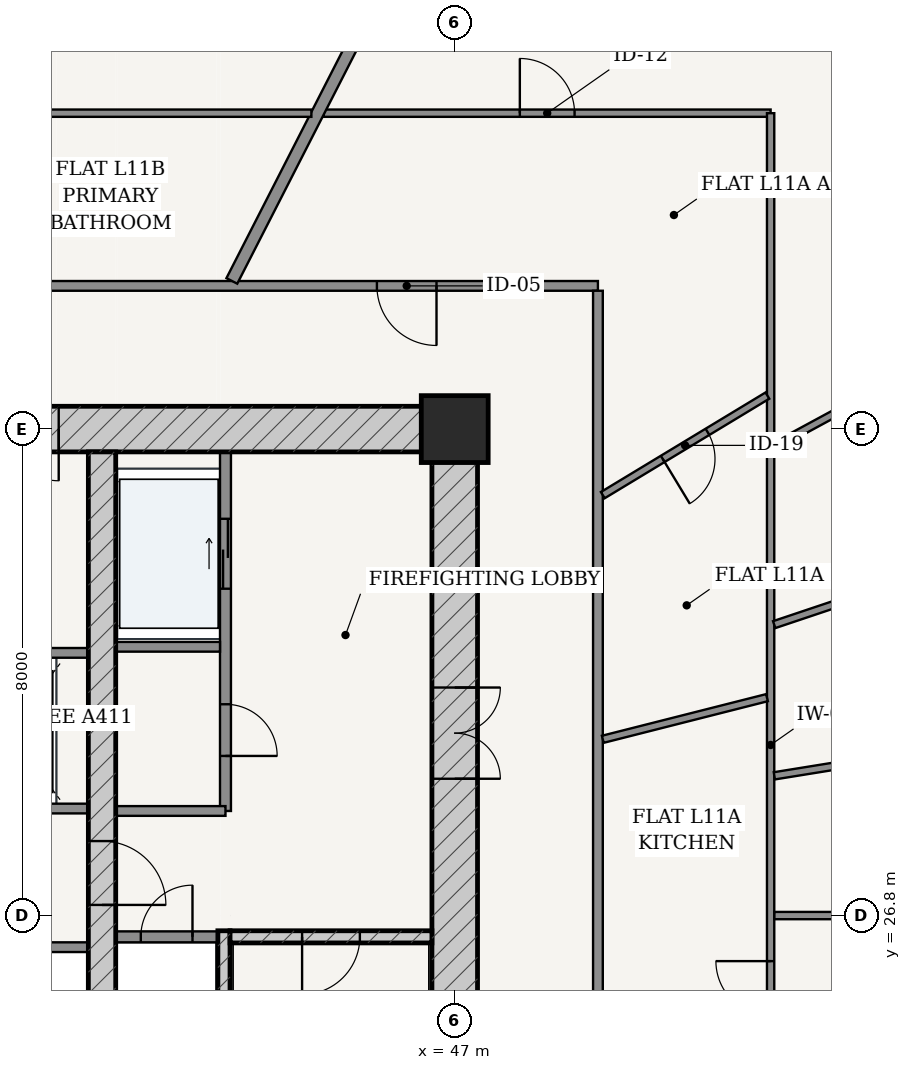
"""IFC4 building model, lengths in metres.
Left out: names, types, materials, properties, quantities, classifications, styles, units other than length and angle.
Written with IfcOpenShell. Run it as: python <this file> out.ifc"""

import sys

from ifc_helpers import new_model, si_unit, direction, frame, frame_2d, origin, origin_2d, place, context, subcontext, project, spatial, rectangle, extrude, source, transform, mapped, element, fill, save


model = new_model("IFC4")
c1 = context("Model", 3, precision=1e-05, world=origin(), true_north=direction((-0.2419218956, 0.970295726276)))
c2 = subcontext(c1, "Body", "Model", "MODEL_VIEW")
j1 = project(units=[si_unit("LENGTHUNIT", "METRE"), si_unit("PLANEANGLEUNIT", "RADIAN")], contexts=[c1])
p1 = place(None, origin())
s1 = spatial("IfcSite", under=j1, at=p1, CompositionType="ELEMENT")
p2 = place(p1, origin())
s2 = spatial("IfcBuilding", under=s1, at=p2, CompositionType="ELEMENT")
p3 = place(p2, frame((0.0, 0.0, 45.6)))
s3 = spatial("IfcBuildingStorey", under=s2, at=p3, CompositionType="ELEMENT", Elevation=45.6)
p4 = place(p3, frame((47.0, 34.8, 0.0), z_axis=(0.0, 0.0, 1.0), x_axis=(1.0, 0.0, 0.0)))
e1 = element("IfcColumn", 1, at=p4, inside=s3, PredefinedType="COLUMN", context=c2, shape_type="SweptSolid", body=[
    extrude(rectangle(XDim=1.1, YDim=1.1, at=origin_2d()), origin(), (0.0, 0.0, 1.0), 3.6),
])
p5 = place(p3, frame((28.625, 34.8, 0.0), z_axis=(0.0, 0.0, 1.0), x_axis=(1.0, 0.0, 0.0)))
e2 = element("IfcWall", 2, at=p5, inside=s3, PredefinedType="SHEAR", context=c2, shape_type="SweptSolid", body=[
    extrude(rectangle(XDim=18.75, YDim=0.75, at=frame_2d((9.375, 0.0))), origin(), (0.0, 0.0, 1.0), 3.32),
])
p6 = place(p5, frame((6.887, 0.0, 0.0)))
e3 = element("IfcOpeningElement", 3, at=p6, cuts=e2, PredefinedType="OPENING", context=c2, shape_type="SweptSolid", body=[
    extrude(rectangle(XDim=0.85, YDim=2.1, at=frame_2d((0.425, 1.05))), frame((0.0, 0.385, 0.0), z_axis=(0.0, -1.0, 0.0), x_axis=(1.0, 0.0, 0.0)), (0.0, 0.0, 1.0), 0.77),
])
p7 = place(p5, frame((8.945, 0.0, 0.0)))
e4 = element("IfcOpeningElement", 4, at=p7, cuts=e2, PredefinedType="OPENING", context=c2, shape_type="SweptSolid", body=[
    extrude(rectangle(XDim=0.86, YDim=2.1, at=frame_2d((0.43, 1.05))), frame((0.0, 0.385, 0.0), z_axis=(0.0, -1.0, 0.0), x_axis=(1.0, 0.0, 0.0)), (0.0, 0.0, 1.0), 0.77),
])
p8 = place(p5, frame((11.012, 0.0, 0.0)))
e5 = element("IfcOpeningElement", 5, at=p8, cuts=e2, PredefinedType="OPENING", context=c2, shape_type="SweptSolid", body=[
    extrude(rectangle(XDim=0.85, YDim=2.1, at=frame_2d((0.425, 1.05))), frame((0.0, 0.385, 0.0), z_axis=(0.0, -1.0, 0.0), x_axis=(1.0, 0.0, 0.0)), (0.0, 0.0, 1.0), 0.77),
])
p9 = place(p3, frame((47.0, 19.175, 0.0), z_axis=(0.0, 0.0, 1.0), x_axis=(0.0, 1.0, 0.0)))
e6 = element("IfcWall", 6, at=p9, inside=s3, PredefinedType="SHEAR", context=c2, shape_type="SweptSolid", body=[
    extrude(rectangle(XDim=15.25, YDim=0.75, at=frame_2d((7.625, 0.0))), origin(), (0.0, 0.0, 1.0), 3.32),
])
p10 = place(p9, frame((9.875, 0.0, 0.0)))
e7 = element("IfcOpeningElement", 7, at=p10, cuts=e6, PredefinedType="OPENING", context=c2, shape_type="SweptSolid", body=[
    extrude(rectangle(XDim=1.5, YDim=2.2, at=frame_2d((0.75, 1.1))), frame((0.0, 0.385, 0.0), z_axis=(0.0, -1.0, 0.0), x_axis=(1.0, 0.0, 0.0)), (0.0, 0.0, 1.0), 0.77),
])
p11 = place(p3, frame((43.205, 19.175, 0.0), z_axis=(0.0, 0.0, 1.0), x_axis=(0.0, 1.0, 0.0)))
e8 = element("IfcWall", 8, at=p11, inside=s3, PredefinedType="SOLIDWALL", context=c2, shape_type="SweptSolid", body=[
    extrude(rectangle(XDim=7.375, YDim=0.2, at=frame_2d((3.688, 0.0))), origin(), (0.0, 0.0, 1.0), 3.32),
])
p12 = place(p3, frame((43.305, 26.45, 0.0), z_axis=(0.0, 0.0, 1.0), x_axis=(1.0, 0.0, 0.0)))
e9 = element("IfcWall", 9, at=p12, inside=s3, PredefinedType="SOLIDWALL", context=c2, shape_type="SweptSolid", body=[
    extrude(rectangle(XDim=3.32, YDim=0.2, at=frame_2d((1.66, 0.0))), origin(), (0.0, 0.0, 1.0), 3.32),
])
p13 = place(p12, frame((1.185, 0.0, 0.0)))
e10 = element("IfcOpeningElement", 10, at=p13, cuts=e9, PredefinedType="OPENING", context=c2, shape_type="SweptSolid", body=[
    extrude(rectangle(XDim=0.95, YDim=2.15, at=frame_2d((0.475, 1.075))), frame((0.0, 0.11, 0.0), z_axis=(0.0, -1.0, 0.0), x_axis=(1.0, 0.0, 0.0)), (0.0, 0.0, 1.0), 0.22),
])
p14 = place(p3, frame((41.2, 19.175, 0.0), z_axis=(0.0, 0.0, 1.0), x_axis=(0.0, 1.0, 0.0)))
e11 = element("IfcWall", 11, at=p14, inside=s3, PredefinedType="SHEAR", context=c2, shape_type="SweptSolid", body=[
    extrude(rectangle(XDim=15.25, YDim=0.45, at=frame_2d((7.625, 0.0))), origin(), (0.0, 0.0, 1.0), 3.32),
])
p15 = place(p14, frame((7.8, 0.0, 0.0)))
e12 = element("IfcOpeningElement", 12, at=p15, cuts=e11, PredefinedType="OPENING", context=c2, shape_type="SweptSolid", body=[
    extrude(rectangle(XDim=1.05, YDim=2.15, at=frame_2d((0.525, 1.075))), frame((0.0, 0.235, 0.0), z_axis=(0.0, -1.0, 0.0), x_axis=(1.0, 0.0, 0.0)), (0.0, 0.0, 1.0), 0.47),
])
p16 = place(p3, frame((41.425, 26.45, 0.0), z_axis=(0.0, 0.0, 1.0), x_axis=(1.0, 0.0, 0.0)))
e13 = element("IfcWall", 13, at=p16, inside=s3, PredefinedType="PARTITIONING", context=c2, shape_type="SweptSolid", body=[
    extrude(rectangle(XDim=1.675, YDim=0.18, at=frame_2d((0.837, 0.0))), origin(), (0.0, 0.0, 1.0), 3.32),
])
p17 = place(p16, frame((0.413, 0.0, 0.0)))
e14 = element("IfcOpeningElement", 14, at=p17, cuts=e13, PredefinedType="OPENING", context=c2, shape_type="SweptSolid", body=[
    extrude(rectangle(XDim=0.85, YDim=2.1, at=frame_2d((0.425, 1.05))), frame((0.0, 0.1, 0.0), z_axis=(0.0, -1.0, 0.0), x_axis=(1.0, 0.0, 0.0)), (0.0, 0.0, 1.0), 0.2),
])
p18 = place(p3, frame((43.23, 28.52, 0.0), z_axis=(0.0, 0.0, 1.0), x_axis=(0.0, 1.0, 0.0)))
e15 = element("IfcWall", 15, at=p18, inside=s3, PredefinedType="PARTITIONING", context=c2, shape_type="SweptSolid", body=[
    extrude(rectangle(XDim=5.905, YDim=0.18, at=frame_2d((2.953, 0.0))), origin(), (0.0, 0.0, 1.0), 3.32),
])
p19 = place(p18, frame((0.905, 0.0, 0.0)))
e16 = element("IfcOpeningElement", 16, at=p19, cuts=e15, PredefinedType="OPENING", context=c2, shape_type="SweptSolid", body=[
    extrude(rectangle(XDim=0.85, YDim=2.1, at=frame_2d((0.425, 1.05))), frame((0.0, 0.1, 0.0), z_axis=(0.0, -1.0, 0.0), x_axis=(1.0, 0.0, 0.0)), (0.0, 0.0, 1.0), 0.2),
])
p20 = place(p18, frame((3.655, 0.0, 0.0)))
e17 = element("IfcOpeningElement", 17, at=p20, cuts=e15, PredefinedType="OPENING", context=c2, shape_type="SweptSolid", body=[
    extrude(rectangle(XDim=1.15, YDim=2.2, at=frame_2d((0.575, 1.1))), frame((0.0, 0.1, 0.0), z_axis=(0.0, -1.0, 0.0), x_axis=(1.0, 0.0, 0.0)), (0.0, 0.0, 1.0), 0.2),
])
p21 = place(p3, frame((41.425, 31.22, 0.0), z_axis=(0.0, 0.0, 1.0), x_axis=(1.0, 0.0, 0.0)))
e18 = element("IfcWall", 18, at=p21, inside=s3, PredefinedType="PARTITIONING", context=c2, shape_type="SweptSolid", body=[
    extrude(rectangle(XDim=1.715, YDim=0.16, at=frame_2d((0.857, 0.0))), origin(), (0.0, 0.0, 1.0), 3.32),
])
p22 = place(p3, frame((41.425, 28.52, 0.0), z_axis=(0.0, 0.0, 1.0), x_axis=(1.0, 0.0, 0.0)))
e19 = element("IfcWall", 19, at=p22, inside=s3, PredefinedType="PARTITIONING", context=c2, shape_type="SweptSolid", body=[
    extrude(rectangle(XDim=1.805, YDim=0.16, at=frame_2d((0.902, 0.0))), origin(), (0.0, 0.0, 1.0), 3.32),
])
p23 = place(p3, frame((35.025, 28.56, 0.0), z_axis=(0.0, 0.0, 1.0), x_axis=(1.0, 0.0, 0.0)))
e20 = element("IfcWall", 20, at=p23, inside=s3, PredefinedType="PARTITIONING", context=c2, shape_type="SweptSolid", body=[
    extrude(rectangle(XDim=5.95, YDim=0.16, at=frame_2d((2.975, 0.0))), origin(), (0.0, 0.0, 1.0), 3.32),
])
p24 = place(p23, frame((0.76, 0.0, 0.0)))
e21 = element("IfcOpeningElement", 21, at=p24, cuts=e20, PredefinedType="OPENING", context=c2, shape_type="SweptSolid", body=[
    extrude(rectangle(XDim=1.1, YDim=2.2, at=frame_2d((0.55, 1.1))), frame((0.0, 0.09, 0.0), z_axis=(0.0, -1.0, 0.0), x_axis=(1.0, 0.0, 0.0)), (0.0, 0.0, 1.0), 0.18),
])
p25 = place(p23, frame((2.425, 0.0, 0.0)))
e22 = element("IfcOpeningElement", 22, at=p25, cuts=e20, PredefinedType="OPENING", context=c2, shape_type="SweptSolid", body=[
    extrude(rectangle(XDim=1.1, YDim=2.2, at=frame_2d((0.55, 1.1))), frame((0.0, 0.09, 0.0), z_axis=(0.0, -1.0, 0.0), x_axis=(1.0, 0.0, 0.0)), (0.0, 0.0, 1.0), 0.18),
])
p26 = place(p23, frame((4.09, 0.0, 0.0)))
e23 = element("IfcOpeningElement", 23, at=p26, cuts=e20, PredefinedType="OPENING", context=c2, shape_type="SweptSolid", body=[
    extrude(rectangle(XDim=1.1, YDim=2.2, at=frame_2d((0.55, 1.1))), frame((0.0, 0.09, 0.0), z_axis=(0.0, -1.0, 0.0), x_axis=(1.0, 0.0, 0.0)), (0.0, 0.0, 1.0), 0.18),
])
for number, where, z_axis, x_axis in (
    (24, (35.025, 31.12, 0.0), (0.0, 0.0, 1.0), (1.0, 0.0, 0.0)),
    (25, (35.025, 26.28, 0.0), (0.0, 0.0, 1.0), (1.0, 0.0, 0.0)),
):
    element("IfcWall", number, at=place(p3, frame(where, z_axis=z_axis, x_axis=x_axis)), inside=s3, PredefinedType="PARTITIONING", context=c2, shape_type="SweptSolid", body=[
        extrude(rectangle(XDim=5.95, YDim=0.16, at=frame_2d((2.975, 0.0))), origin(), (0.0, 0.0, 1.0), 3.32),
    ])
p27 = place(p3, frame((26.645, 37.155, 0.0), z_axis=(0.0, 0.0, 1.0), x_axis=(1.0, 0.0, 0.0)))
e26 = element("IfcWall", 26, at=p27, inside=s3, PredefinedType="PARTITIONING", context=c2, shape_type="SweptSolid", body=[
    extrude(rectangle(XDim=22.71, YDim=0.16, at=frame_2d((11.355, 0.0))), origin(), (0.0, 0.0, 1.0), 2.688),
])
p28 = place(p27, frame((19.075, 0.0, 0.0)))
e27 = element("IfcOpeningElement", 27, at=p28, cuts=e26, PredefinedType="OPENING", context=c2, shape_type="SweptSolid", body=[
    extrude(rectangle(XDim=0.98, YDim=2.2, at=frame_2d((0.49, 1.1))), frame((0.0, 0.09, 0.0), z_axis=(0.0, -1.0, 0.0), x_axis=(1.0, 0.0, 0.0)), (0.0, 0.0, 1.0), 0.18),
])
p29 = place(p27, frame((6.221, 0.0, 0.0)))
e28 = element("IfcOpeningElement", 28, at=p29, cuts=e26, PredefinedType="OPENING", context=c2, shape_type="SweptSolid", body=[
    extrude(rectangle(XDim=0.98, YDim=2.2, at=frame_2d((0.49, 1.1))), frame((0.0, 0.09, 0.0), z_axis=(0.0, -1.0, 0.0), x_axis=(1.0, 0.0, 0.0)), (0.0, 0.0, 1.0), 0.18),
])
p30 = place(p3, frame((49.355, 16.525, 0.0), z_axis=(0.0, 0.0, 1.0), x_axis=(0.0, 1.0, 0.0)))
e29 = element("IfcWall", 29, at=p30, inside=s3, PredefinedType="PARTITIONING", context=c2, shape_type="SweptSolid", body=[
    extrude(rectangle(XDim=20.55, YDim=0.16, at=frame_2d((10.275, 0.0))), origin(), (0.0, 0.0, 1.0), 2.688),
])
p31 = place(p3, frame((44.847, 39.995, 0.0), z_axis=(0.0, 0.0, 1.0), x_axis=(1.0, 0.0, 0.0)))
e30 = element("IfcWall", 30, at=p31, inside=s3, PredefinedType="PARTITIONING", context=c2, shape_type="SweptSolid", body=[
    extrude(rectangle(XDim=7.348, YDim=0.12, at=frame_2d((3.674, 0.0))), origin(), (0.0, 0.0, 1.0), 2.688),
])
p32 = place(p31, frame((3.224, 0.0, 0.0)))
e31 = element("IfcOpeningElement", 31, at=p32, cuts=e30, PredefinedType="OPENING", context=c2, shape_type="SweptSolid", body=[
    extrude(rectangle(XDim=0.9, YDim=2.15, at=frame_2d((0.45, 1.075))), frame((0.0, 0.07, 0.0), z_axis=(0.0, -1.0, 0.0), x_axis=(1.0, 0.0, 0.0)), (0.0, 0.0, 1.0), 0.14),
])
p33 = place(p3, frame((52.195, 39.995, 0.0), z_axis=(0.0, 0.0, 1.0), x_axis=(0.0, -1.0, 0.0)))
e32 = element("IfcWall", 32, at=p33, inside=s3, PredefinedType="PARTITIONING", context=c2, shape_type="SweptSolid", body=[
    extrude(rectangle(XDim=20.779, YDim=0.12, at=frame_2d((10.39, 0.0))), origin(), (0.0, 0.0, 1.0), 2.688),
])
p34 = place(p33, frame((13.944, 0.0, 0.0)))
e33 = element("IfcOpeningElement", 33, at=p34, cuts=e32, PredefinedType="OPENING", context=c2, shape_type="SweptSolid", body=[
    extrude(rectangle(XDim=0.9, YDim=2.15, at=frame_2d((0.45, 1.075))), frame((0.0, 0.07, 0.0), z_axis=(0.0, -1.0, 0.0), x_axis=(1.0, 0.0, 0.0)), (0.0, 0.0, 1.0), 0.14),
])
p35 = place(p33, frame((17.655, 0.0, 0.0)))
e34 = element("IfcOpeningElement", 34, at=p35, cuts=e32, PredefinedType="OPENING", context=c2, shape_type="SweptSolid", body=[
    extrude(rectangle(XDim=0.9, YDim=2.15, at=frame_2d((0.45, 1.075))), frame((0.0, 0.07, 0.0), z_axis=(0.0, -1.0, 0.0), x_axis=(1.0, 0.0, 0.0)), (0.0, 0.0, 1.0), 0.14),
])
p36 = place(p3, frame((52.257, 26.8, 0.0), z_axis=(0.0, 0.0, 1.0), x_axis=(1.0, 0.0, 0.0)))
e35 = element("IfcWall", 35, at=p36, inside=s3, PredefinedType="PARTITIONING", context=c2, shape_type="SweptSolid", body=[
    extrude(rectangle(XDim=14.683, YDim=0.12, at=frame_2d((7.341, 0.0))), origin(), (0.0, 0.0, 1.0), 2.762),
])
p37 = place(p36, frame((6.892, 0.0, 0.0)))
e36 = element("IfcOpeningElement", 36, at=p37, cuts=e35, PredefinedType="OPENING", context=c2, shape_type="SweptSolid", body=[
    extrude(rectangle(XDim=0.9, YDim=2.15, at=frame_2d((0.45, 1.075))), frame((0.0, 0.07, 0.0), z_axis=(0.0, -1.0, 0.0), x_axis=(1.0, 0.0, 0.0)), (0.0, 0.0, 1.0), 0.14),
])
p38 = place(p3, frame((52.256, 29.098, 0.0), z_axis=(0.0, 0.0, 1.0), x_axis=(0.987257017041, 0.159133850272, 0.0)))
e37 = element("IfcWall", 37, at=p38, inside=s3, PredefinedType="PARTITIONING", context=c2, shape_type="SweptSolid", body=[
    extrude(rectangle(XDim=14.248, YDim=0.12, at=frame_2d((7.124, 0.0))), origin(), (0.0, 0.0, 1.0), 2.688),
])
p39 = place(p38, frame((5.603, 0.0, 0.0)))
e38 = element("IfcOpeningElement", 38, at=p39, cuts=e37, PredefinedType="OPENING", context=c2, shape_type="SweptSolid", body=[
    extrude(rectangle(XDim=0.9, YDim=2.15, at=frame_2d((0.45, 1.075))), frame((0.0, 0.07, 0.0), z_axis=(0.0, -1.0, 0.0), x_axis=(1.0, 0.0, 0.0)), (0.0, 0.0, 1.0), 0.14),
])
p40 = place(p3, frame((52.254, 31.584, 0.0), z_axis=(0.0, 0.0, 1.0), x_axis=(0.948022802246, 0.318202398516, 0.0)))
e39 = element("IfcWall", 39, at=p40, inside=s3, PredefinedType="PARTITIONING", context=c2, shape_type="SweptSolid", body=[
    extrude(rectangle(XDim=13.163, YDim=0.12, at=frame_2d((6.582, 0.0))), origin(), (0.0, 0.0, 1.0), 2.762),
])
p41 = place(p40, frame((6.131, 0.0, 0.0)))
e40 = element("IfcOpeningElement", 40, at=p41, cuts=e39, PredefinedType="OPENING", context=c2, shape_type="SweptSolid", body=[
    extrude(rectangle(XDim=0.9, YDim=2.15, at=frame_2d((0.45, 1.075))), frame((0.0, 0.07, 0.0), z_axis=(0.0, -1.0, 0.0), x_axis=(1.0, 0.0, 0.0)), (0.0, 0.0, 1.0), 0.14),
])
p42 = place(p3, frame((52.25, 34.515, 0.0), z_axis=(0.0, 0.0, 1.0), x_axis=(0.879370672984, 0.476137815654, 0.0)))
e41 = element("IfcWall", 41, at=p42, inside=s3, PredefinedType="PARTITIONING", context=c2, shape_type="SweptSolid", body=[
    extrude(rectangle(XDim=11.094, YDim=0.12, at=frame_2d((5.547, 0.0))), origin(), (0.0, 0.0, 1.0), 2.688),
])
p43 = place(p42, frame((4.034, 0.0, 0.0)))
e42 = element("IfcOpeningElement", 42, at=p43, cuts=e41, PredefinedType="OPENING", context=c2, shape_type="SweptSolid", body=[
    extrude(rectangle(XDim=0.9, YDim=2.15, at=frame_2d((0.45, 1.075))), frame((0.0, 0.07, 0.0), z_axis=(0.0, -1.0, 0.0), x_axis=(1.0, 0.0, 0.0)), (0.0, 0.0, 1.0), 0.14),
])
p44 = place(p3, frame((49.435, 29.699, 0.0), z_axis=(0.0, 0.0, 1.0), x_axis=(0.969327617988, 0.245772189243, 0.0)))
e43 = element("IfcWall", 43, at=p44, inside=s3, PredefinedType="PARTITIONING", context=c2, shape_type="SweptSolid", body=[
    extrude(rectangle(XDim=2.785, YDim=0.12, at=frame_2d((1.393, 0.0))), origin(), (0.0, 0.0, 1.0), 3.32),
])
p45 = place(p3, frame((49.435, 33.714, 0.0), z_axis=(0.0, 0.0, 1.0), x_axis=(0.855724035959, 0.517432482824, 0.0)))
e44 = element("IfcWall", 44, at=p45, inside=s3, PredefinedType="PARTITIONING", context=c2, shape_type="SweptSolid", body=[
    extrude(rectangle(XDim=3.163, YDim=0.12, at=frame_2d((1.582, 0.0))), origin(), (0.0, 0.0, 1.0), 3.32),
])
p46 = place(p45, frame((1.152, 0.0, 0.0)))
e45 = element("IfcOpeningElement", 45, at=p46, cuts=e44, PredefinedType="OPENING", context=c2, shape_type="SweptSolid", body=[
    extrude(rectangle(XDim=0.86, YDim=2.15, at=frame_2d((0.43, 1.075))), frame((0.0, 0.07, 0.0), z_axis=(0.0, -1.0, 0.0), x_axis=(1.0, 0.0, 0.0)), (0.0, 0.0, 1.0), 0.14),
])
p47 = place(p3, frame((43.335, 37.237, 0.0), z_axis=(0.0, 0.0, 1.0), x_axis=(0.455148959499, 0.890415310216, 0.0)))
e46 = element("IfcWall", 46, at=p47, inside=s3, PredefinedType="PARTITIONING", context=c2, shape_type="SweptSolid", body=[
    extrude(rectangle(XDim=12.598, YDim=0.2, at=frame_2d((6.299, 0.0))), origin(), (0.0, 0.0, 1.0), 2.762),
])
p48 = place(p3, frame((23.805, 39.995, 0.0), z_axis=(0.0, 0.0, 1.0), x_axis=(1.0, 0.0, 0.0)))
e47 = element("IfcWall", 47, at=p48, inside=s3, PredefinedType="PARTITIONING", context=c2, shape_type="SweptSolid", body=[
    extrude(rectangle(XDim=20.838, YDim=0.12, at=frame_2d((10.419, 0.0))), origin(), (0.0, 0.0, 1.0), 2.688),
])
p49 = place(p48, frame((11.931, 0.0, 0.0)))
e48 = element("IfcOpeningElement", 48, at=p49, cuts=e47, PredefinedType="OPENING", context=c2, shape_type="SweptSolid", body=[
    extrude(rectangle(XDim=0.9, YDim=2.15, at=frame_2d((0.45, 1.075))), frame((0.0, 0.07, 0.0), z_axis=(0.0, -1.0, 0.0), x_axis=(1.0, 0.0, 0.0)), (0.0, 0.0, 1.0), 0.14),
])
m1 = source(origin(), c2, "Body", "SweptSolid", [
    extrude(rectangle(XDim=1.5, YDim=2.2, at=frame_2d((0.75, 1.1))), frame((0.0, 0.025, 0.0), z_axis=(0.0, -1.0, 0.0), x_axis=(1.0, 0.0, 0.0)), (0.0, 0.0, 1.0), 0.05),
])
p50 = place(p10, frame((1.5, 0.0, 0.0), z_axis=(0.0, 0.0, 1.0), x_axis=(-1.0, 0.0, 0.0)))
e49 = element("IfcDoor", 49, at=p50, inside=s3, OperationType="DOUBLE_DOOR_SINGLE_SWING", PredefinedType="DOOR", context=c2, shape_type="MappedRepresentation", body=[
    mapped(m1, transform((0.0, 0.0, 0.0), scale=1.0)),
])
fill(e7, e49)
m2 = source(origin(), c2, "Body", "SweptSolid", [
    extrude(rectangle(XDim=1.05, YDim=2.15, at=frame_2d((0.525, 1.075))), frame((0.0, 0.025, 0.0), z_axis=(0.0, -1.0, 0.0), x_axis=(1.0, 0.0, 0.0)), (0.0, 0.0, 1.0), 0.05),
])
p51 = place(p15, frame((1.05, 0.0, 0.0), z_axis=(0.0, 0.0, 1.0), x_axis=(-1.0, 0.0, 0.0)))
e50 = element("IfcDoor", 50, at=p51, inside=s3, OperationType="SINGLE_SWING_RIGHT", PredefinedType="DOOR", context=c2, shape_type="MappedRepresentation", body=[
    mapped(m2, transform((0.0, 0.0, 0.0), scale=1.0)),
])
fill(e12, e50)
m3 = source(origin(), c2, "Body", "SweptSolid", [
    extrude(rectangle(XDim=0.95, YDim=2.15, at=frame_2d((0.475, 1.075))), frame((0.0, 0.025, 0.0), z_axis=(0.0, -1.0, 0.0), x_axis=(1.0, 0.0, 0.0)), (0.0, 0.0, 1.0), 0.05),
])
p52 = place(p13, frame((0.95, 0.0, 0.0), z_axis=(0.0, 0.0, 1.0), x_axis=(-1.0, 0.0, 0.0)))
e51 = element("IfcDoor", 51, at=p52, inside=s3, OperationType="SINGLE_SWING_RIGHT", PredefinedType="DOOR", context=c2, shape_type="MappedRepresentation", body=[
    mapped(m3, transform((0.0, 0.0, 0.0), scale=1.0)),
])
fill(e10, e51)
m4 = source(origin(), c2, "Body", "SweptSolid", [
    extrude(rectangle(XDim=0.85, YDim=2.1, at=frame_2d((0.425, 1.05))), frame((0.0, 0.025, 0.0), z_axis=(0.0, -1.0, 0.0), x_axis=(1.0, 0.0, 0.0)), (0.0, 0.0, 1.0), 0.05),
])
p53 = place(p17, origin())
e52 = element("IfcDoor", 52, at=p53, inside=s3, OperationType="SINGLE_SWING_RIGHT", PredefinedType="DOOR", context=c2, shape_type="MappedRepresentation", body=[
    mapped(m4, transform((0.0, 0.0, 0.0), scale=1.0)),
])
fill(e14, e52)
p54 = place(p19, frame((0.85, 0.0, 0.0), z_axis=(0.0, 0.0, 1.0), x_axis=(-1.0, 0.0, 0.0)))
e53 = element("IfcDoor", 53, at=p54, inside=s3, OperationType="SINGLE_SWING_RIGHT", PredefinedType="DOOR", context=c2, shape_type="MappedRepresentation", body=[
    mapped(m4, transform((0.0, 0.0, 0.0), scale=1.0)),
])
fill(e16, e53)
p55 = place(p8, frame((0.85, 0.0, 0.0), z_axis=(0.0, 0.0, 1.0), x_axis=(-1.0, 0.0, 0.0)))
e54 = element("IfcDoor", 54, at=p55, inside=s3, OperationType="SINGLE_SWING_LEFT", PredefinedType="DOOR", context=c2, shape_type="MappedRepresentation", body=[
    mapped(m4, transform((0.0, 0.0, 0.0), scale=1.0)),
])
fill(e5, e54)
m5 = source(origin(), c2, "Body", "SweptSolid", [
    extrude(rectangle(XDim=1.15, YDim=2.2, at=frame_2d((0.575, 1.1))), frame((0.0, 0.025, 0.0), z_axis=(0.0, -1.0, 0.0), x_axis=(1.0, 0.0, 0.0)), (0.0, 0.0, 1.0), 0.05),
])
p56 = place(p20, origin())
e55 = element("IfcDoor", 55, at=p56, inside=s3, OperationType="DOUBLE_DOOR_SLIDING", PredefinedType="DOOR", context=c2, shape_type="MappedRepresentation", body=[
    mapped(m5, transform((0.0, 0.0, 0.0), scale=1.0)),
])
fill(e17, e55)
m6 = source(origin(), c2, "Body", "SweptSolid", [
    extrude(rectangle(XDim=0.98, YDim=2.2, at=frame_2d((0.49, 1.1))), frame((0.0, 0.025, 0.0), z_axis=(0.0, -1.0, 0.0), x_axis=(1.0, 0.0, 0.0)), (0.0, 0.0, 1.0), 0.05),
])
p57 = place(p28, frame((0.98, 0.0, 0.0), z_axis=(0.0, 0.0, 1.0), x_axis=(-1.0, 0.0, 0.0)))
e56 = element("IfcDoor", 56, at=p57, inside=s3, OperationType="SINGLE_SWING_LEFT", PredefinedType="DOOR", context=c2, shape_type="MappedRepresentation", body=[
    mapped(m6, transform((0.0, 0.0, 0.0), scale=1.0)),
])
fill(e27, e56)
m7 = source(origin(), c2, "Body", "SweptSolid", [
    extrude(rectangle(XDim=0.86, YDim=2.15, at=frame_2d((0.43, 1.075))), frame((0.0, 0.025, 0.0), z_axis=(0.0, -1.0, 0.0), x_axis=(1.0, 0.0, 0.0)), (0.0, 0.0, 1.0), 0.05),
])
p58 = place(p46, frame((0.86, 0.0, 0.0), z_axis=(0.0, 0.0, 1.0), x_axis=(-1.0, 0.0, 0.0)))
e57 = element("IfcDoor", 57, at=p58, inside=s3, OperationType="SINGLE_SWING_RIGHT", PredefinedType="DOOR", context=c2, shape_type="MappedRepresentation", body=[
    mapped(m7, transform((0.0, 0.0, 0.0), scale=1.0)),
])
fill(e45, e57)
m8 = source(origin(), c2, "Body", "SweptSolid", [
    extrude(rectangle(XDim=0.9, YDim=2.15, at=frame_2d((0.45, 1.075))), frame((0.0, 0.025, 0.0), z_axis=(0.0, -1.0, 0.0), x_axis=(1.0, 0.0, 0.0)), (0.0, 0.0, 1.0), 0.05),
])
p59 = place(p32, origin())
e58 = element("IfcDoor", 58, at=p59, inside=s3, OperationType="SINGLE_SWING_LEFT", PredefinedType="DOOR", context=c2, shape_type="MappedRepresentation", body=[
    mapped(m8, transform((0.0, 0.0, 0.0), scale=1.0)),
])
fill(e31, e58)
p60 = place(p34, frame((0.9, 0.0, 0.0), z_axis=(0.0, 0.0, 1.0), x_axis=(-1.0, 0.0, 0.0)))
e59 = element("IfcDoor", 59, at=p60, inside=s3, OperationType="SINGLE_SWING_RIGHT", PredefinedType="DOOR", context=c2, shape_type="MappedRepresentation", body=[
    mapped(m8, transform((0.0, 0.0, 0.0), scale=1.0)),
])
fill(e33, e59)
save(model, sys.argv[1])
